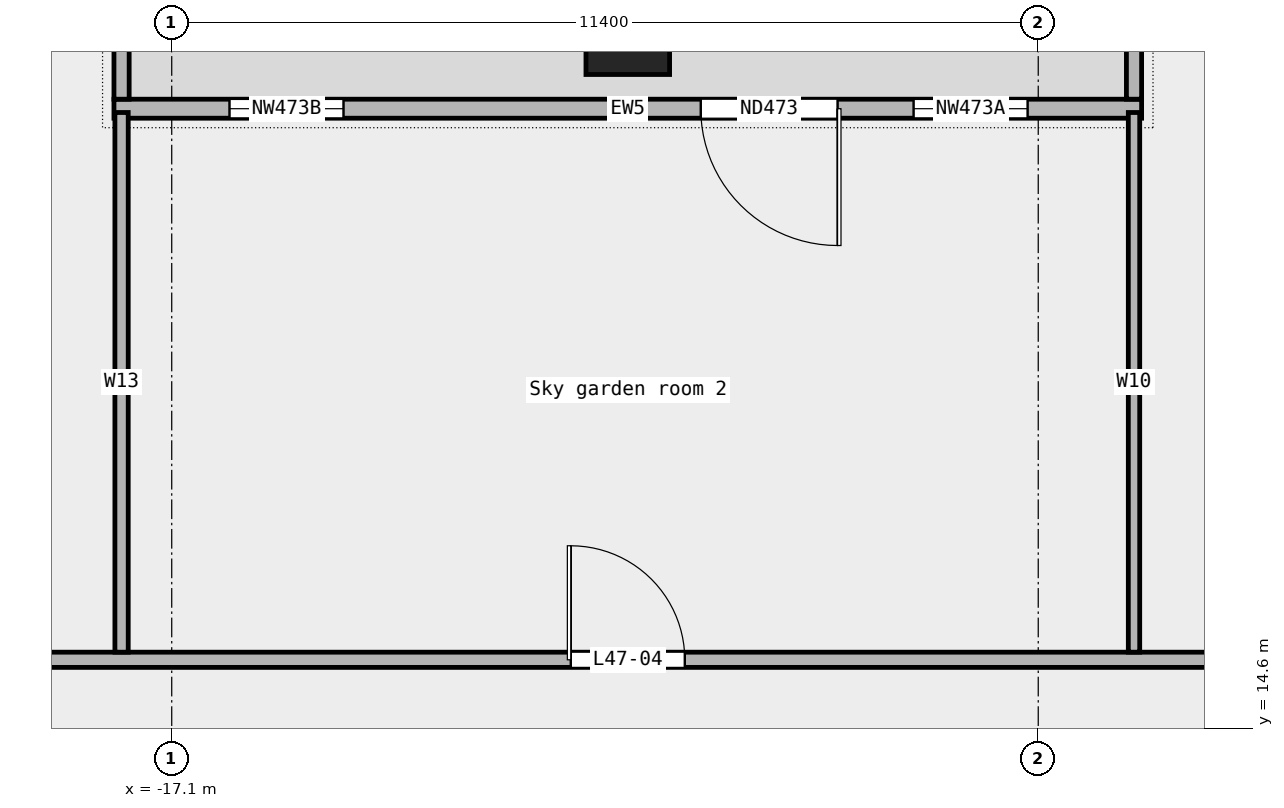
"""IFC4 building model, lengths in metres.
Left out: names, types, materials, properties, quantities, classifications, styles, units other than length and angle.
Written with IfcOpenShell. Run it as: python <this file> out.ifc"""

import sys

from ifc_helpers import new_model, si_unit, direction, frame, frame_2d, origin, origin_2d, place, context, subcontext, project, spatial, rectangle, extrude, element, fill, save


model = new_model("IFC4")
c1 = context("Model", 3, precision=1e-05, world=origin(), true_north=direction((0.0, 1.0)))
c2 = subcontext(c1, "Body", "Model", "MODEL_VIEW")
j1 = project(units=[si_unit("LENGTHUNIT", "METRE"), si_unit("PLANEANGLEUNIT", "RADIAN")], contexts=[c1])
p1 = place(None, origin())
s1 = spatial("IfcSite", under=j1, at=p1, CompositionType="ELEMENT")
p2 = place(p1, origin())
s2 = spatial("IfcBuilding", under=s1, at=p2, CompositionType="ELEMENT")
p3 = place(p2, frame((0.0, 0.0, 223.0)))
s3 = spatial("IfcBuildingStorey", under=s2, at=p3, CompositionType="ELEMENT", Elevation=223.0)
p4 = place(p3, frame((-11.1, 23.75, 0.0), z_axis=(0.0, 0.0, 1.0), x_axis=(1.0, 0.0, 0.0)))
e1 = element("IfcColumn", 1, at=p4, inside=s3, PredefinedType="COLUMN", context=c2, shape_type="SweptSolid", body=[
    extrude(rectangle(XDim=1.1, YDim=1.1, at=origin_2d()), origin(), (0.0, 0.0, 1.0), 3.6),
])
p5 = place(p3, frame((-4.34, 22.75, 0.0), z_axis=(0.0, 0.0, 1.0), x_axis=(-1.0, 0.0, 0.0)))
e2 = element("IfcWall", 2, at=p5, inside=s3, PredefinedType="STANDARD", context=c2, shape_type="SweptSolid", body=[
    extrude(rectangle(XDim=13.52, YDim=0.25, at=frame_2d((6.76, 0.0))), origin(), (0.0, 0.0, 1.0), 3.6),
])
p6 = place(p5, frame((1.5, 0.0, 0.45)))
e3 = element("IfcOpeningElement", 3, at=p6, cuts=e2, PredefinedType="OPENING", context=c2, shape_type="SweptSolid", body=[
    extrude(rectangle(XDim=1.5, YDim=2.4, at=frame_2d((0.75, 1.2))), frame((0.0, 0.137, 0.0), z_axis=(0.0, -1.0, 0.0), x_axis=(1.0, 0.0, 0.0)), (0.0, 0.0, 1.0), 0.274),
])
p7 = place(p5, frame((4.0, 0.0, 0.0)))
e4 = element("IfcOpeningElement", 4, at=p7, cuts=e2, PredefinedType="OPENING", context=c2, shape_type="SweptSolid", body=[
    extrude(rectangle(XDim=1.8, YDim=2.4, at=frame_2d((0.9, 1.2))), frame((0.0, 0.137, 0.0), z_axis=(0.0, -1.0, 0.0), x_axis=(1.0, 0.0, 0.0)), (0.0, 0.0, 1.0), 0.274),
])
p8 = place(p5, frame((10.5, 0.0, 0.45)))
e5 = element("IfcOpeningElement", 5, at=p8, cuts=e2, PredefinedType="OPENING", context=c2, shape_type="SweptSolid", body=[
    extrude(rectangle(XDim=1.5, YDim=2.4, at=frame_2d((0.75, 1.2))), frame((0.0, 0.137, 0.0), z_axis=(0.0, -1.0, 0.0), x_axis=(1.0, 0.0, 0.0)), (0.0, 0.0, 1.0), 0.274),
])
for number, where, z_axis, x_axis in (
    (6, (-4.44, 24.75, 0.0), (0.0, 0.0, 1.0), (0.0, -1.0, 0.0)),
    (7, (-17.76, 24.75, 0.0), (0.0, 0.0, 1.0), (0.0, -1.0, 0.0)),
):
    element("IfcWall", number, at=place(p3, frame(where, z_axis=z_axis, x_axis=x_axis)), inside=s3, PredefinedType="STANDARD", context=c2, shape_type="SweptSolid", body=[
        extrude(rectangle(XDim=1.875, YDim=0.2, at=frame_2d((0.938, 0.0))), origin(), (0.0, 0.0, 1.0), 3.6),
    ])
p9 = place(p3, frame((-28.15, 15.5, 0.0), z_axis=(0.0, 0.0, 1.0), x_axis=(1.0, 0.0, 0.0)))
e8 = element("IfcWall", 8, at=p9, inside=s3, PredefinedType="PARTITIONING", context=c2, shape_type="SweptSolid", body=[
    extrude(rectangle(XDim=56.3, YDim=0.2, at=frame_2d((28.15, 0.0))), origin(), (0.0, 0.0, 1.0), 3.6),
])
p10 = place(p9, frame((16.3, 0.0, 0.0)))
e9 = element("IfcOpeningElement", 9, at=p10, cuts=e8, PredefinedType="OPENING", context=c2, shape_type="SweptSolid", body=[
    extrude(rectangle(XDim=1.5, YDim=2.1, at=frame_2d((0.75, 1.05))), frame((0.0, 0.112, 0.0), z_axis=(0.0, -1.0, 0.0), x_axis=(1.0, 0.0, 0.0)), (0.0, 0.0, 1.0), 0.224),
])
p11 = place(p9, frame((46.225, 0.0, 0.0)))
e10 = element("IfcOpeningElement", 10, at=p11, cuts=e8, PredefinedType="OPENING", context=c2, shape_type="SweptSolid", body=[
    extrude(rectangle(XDim=1.8, YDim=2.1, at=frame_2d((0.9, 1.05))), frame((0.0, 0.112, 0.0), z_axis=(0.0, -1.0, 0.0), x_axis=(1.0, 0.0, 0.0)), (0.0, 0.0, 1.0), 0.224),
])
p12 = place(p9, frame((30.18, 0.0, 0.0)))
e11 = element("IfcOpeningElement", 11, at=p12, cuts=e8, PredefinedType="OPENING", context=c2, shape_type="SweptSolid", body=[
    extrude(rectangle(XDim=1.5, YDim=2.1, at=frame_2d((0.75, 1.05))), frame((0.0, 0.112, 0.0), z_axis=(0.0, -1.0, 0.0), x_axis=(1.0, 0.0, 0.0)), (0.0, 0.0, 1.0), 0.224),
])
p13 = place(p9, frame((4.695, 0.0, 0.0)))
e12 = element("IfcOpeningElement", 12, at=p13, cuts=e8, PredefinedType="OPENING", context=c2, shape_type="SweptSolid", body=[
    extrude(rectangle(XDim=1.2, YDim=2.1, at=frame_2d((0.6, 1.05))), frame((0.0, 0.112, 0.0), z_axis=(0.0, -1.0, 0.0), x_axis=(1.0, 0.0, 0.0)), (0.0, 0.0, 1.0), 0.224),
])
p14 = place(p3, frame((-17.76, 15.6, 0.0), z_axis=(0.0, 0.0, 1.0), x_axis=(0.0, 1.0, 0.0)))
e13 = element("IfcWall", 13, at=p14, inside=s3, PredefinedType="PARTITIONING", context=c2, shape_type="SweptSolid", body=[
    extrude(rectangle(XDim=7.1, YDim=0.175, at=frame_2d((3.55, 0.0))), origin(), (0.0, 0.0, 1.0), 3.6),
])
p15 = place(p3, frame((-4.44, 15.6, 0.0), z_axis=(0.0, 0.0, 1.0), x_axis=(0.0, 1.0, 0.0)))
e14 = element("IfcWall", 14, at=p15, inside=s3, PredefinedType="PARTITIONING", context=c2, shape_type="SweptSolid", body=[
    extrude(rectangle(XDim=7.1, YDim=0.15, at=frame_2d((3.55, 0.0))), origin(), (0.0, 0.0, 1.0), 3.6),
])
p16 = place(p6, origin())
e15 = element("IfcWindow", 15, at=p16, inside=s3, PartitioningType="SINGLE_PANEL", PredefinedType="WINDOW", context=c2, shape_type="SweptSolid", body=[
    extrude(rectangle(XDim=1.5, YDim=2.4, at=frame_2d((0.75, 1.2))), frame((0.0, 0.03, 0.0), z_axis=(0.0, -1.0, 0.0), x_axis=(1.0, 0.0, 0.0)), (0.0, 0.0, 1.0), 0.06),
])
fill(e3, e15)
p17 = place(p7, origin())
e16 = element("IfcDoor", 16, at=p17, inside=s3, OperationType="DOUBLE_DOOR_SINGLE_SWING", PredefinedType="DOOR", context=c2, shape_type="SweptSolid", body=[
    extrude(rectangle(XDim=1.8, YDim=2.4, at=frame_2d((0.9, 1.2))), frame((0.0, 0.025, 0.0), z_axis=(0.0, -1.0, 0.0), x_axis=(1.0, 0.0, 0.0)), (0.0, 0.0, 1.0), 0.05),
])
fill(e4, e16)
p18 = place(p8, origin())
e17 = element("IfcWindow", 17, at=p18, inside=s3, PartitioningType="SINGLE_PANEL", PredefinedType="WINDOW", context=c2, shape_type="SweptSolid", body=[
    extrude(rectangle(XDim=1.5, YDim=2.4, at=frame_2d((0.75, 1.2))), frame((0.0, 0.03, 0.0), z_axis=(0.0, -1.0, 0.0), x_axis=(1.0, 0.0, 0.0)), (0.0, 0.0, 1.0), 0.06),
])
fill(e5, e17)
p19 = place(p10, origin())
e18 = element("IfcDoor", 18, at=p19, inside=s3, OperationType="DOUBLE_DOOR_SINGLE_SWING", PredefinedType="DOOR", context=c2, shape_type="SweptSolid", body=[
    extrude(rectangle(XDim=1.5, YDim=2.1, at=frame_2d((0.75, 1.05))), frame((0.0, 0.025, 0.0), z_axis=(0.0, -1.0, 0.0), x_axis=(1.0, 0.0, 0.0)), (0.0, 0.0, 1.0), 0.05),
])
fill(e9, e18)
save(model, sys.argv[1])
